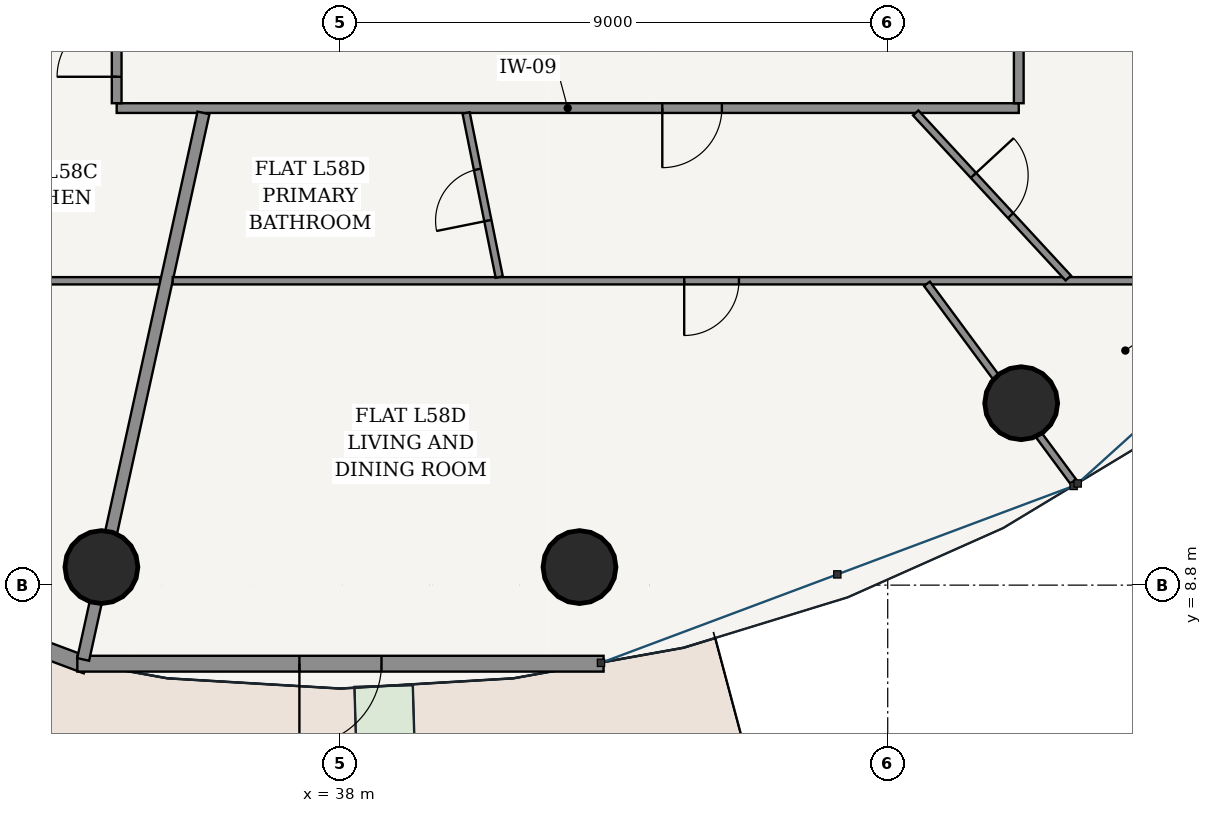
"""IFC4 building model, lengths in metres.
Left out: names, types, materials, properties, quantities, classifications, styles, units other than length and angle.
Written with IfcOpenShell. Run it as: python <this file> out.ifc"""

import sys

from ifc_helpers import new_model, si_unit, direction, frame, frame_2d, origin, origin_2d, place, context, subcontext, project, spatial, rectangle, hollow_circle, extrude, source, transform, mapped, element, fill, save


model = new_model("IFC4")
c1 = context("Model", 3, precision=1e-05, world=origin(), true_north=direction((-0.2419218956, 0.970295726276)))
c2 = subcontext(c1, "Body", "Model", "MODEL_VIEW")
j1 = project(units=[si_unit("LENGTHUNIT", "METRE"), si_unit("PLANEANGLEUNIT", "RADIAN")], contexts=[c1])
p1 = place(None, origin())
s1 = spatial("IfcSite", under=j1, at=p1, CompositionType="ELEMENT")
p2 = place(p1, origin())
s2 = spatial("IfcBuilding", under=s1, at=p2, CompositionType="ELEMENT")
p3 = place(p2, frame((0.0, 0.0, 220.8)))
s3 = spatial("IfcBuildingStorey", under=s2, at=p3, CompositionType="ELEMENT", Elevation=220.8)
for number, where, z_axis, x_axis in (
    (1, (34.069, 9.097, 0.0), (0.0, 0.0, 1.0), (1.0, 0.0, 0.0)),
    (2, (41.931, 9.097, 0.0), (0.0, 0.0, 1.0), (1.0, 0.0, 0.0)),
    (3, (49.195, 11.792, 0.0), (0.0, 0.0, 1.0), (1.0, 0.0, 0.0)),
):
    element("IfcColumn", number, at=place(p3, frame(where, z_axis=z_axis, x_axis=x_axis)), inside=s3, PredefinedType="COLUMN", context=c2, shape_type="SweptSolid", body=[
        extrude(hollow_circle(Radius=0.6, WallThickness=0.038, at=origin_2d()), origin(), (0.0, 0.0, 1.0), 3.7),
    ])
p4 = place(p3, frame((25.83, 10.473, 0.0), z_axis=(0.0, 0.0, 1.0), x_axis=(0.936556918375, -0.350515532672, 0.0)))
e4 = element("IfcWall", 4, at=p4, inside=s3, PredefinedType="SOLIDWALL", context=c2, shape_type="SweptSolid", body=[
    extrude(rectangle(XDim=8.539, YDim=0.28, at=frame_2d((4.27, 0.0))), origin(), (0.0, 0.0, 1.0), 3.435),
])
p5 = place(p4, frame((1.256, 0.0, 0.85)))
e5 = element("IfcOpeningElement", 5, at=p5, cuts=e4, PredefinedType="OPENING", context=c2, shape_type="SweptSolid", body=[
    extrude(rectangle(XDim=2.1, YDim=1.95, at=frame_2d((1.05, 0.975))), frame((0.0, 0.15, 0.0), z_axis=(0.0, -1.0, 0.0), x_axis=(1.0, 0.0, 0.0)), (0.0, 0.0, 1.0), 0.3),
])
p6 = place(p4, frame((5.184, 0.0, 0.85)))
e6 = element("IfcOpeningElement", 6, at=p6, cuts=e4, PredefinedType="OPENING", context=c2, shape_type="SweptSolid", body=[
    extrude(rectangle(XDim=2.1, YDim=1.95, at=frame_2d((1.05, 0.975))), frame((0.0, 0.15, 0.0), z_axis=(0.0, -1.0, 0.0), x_axis=(1.0, 0.0, 0.0)), (0.0, 0.0, 1.0), 0.3),
])
p7 = place(p3, frame((33.673, 7.508, 0.0), z_axis=(0.0, 0.0, 1.0), x_axis=(1.0, 0.0, 0.0)))
e7 = element("IfcWall", 7, at=p7, inside=s3, PredefinedType="SOLIDWALL", context=c2, shape_type="SweptSolid", body=[
    extrude(rectangle(XDim=8.654, YDim=0.26, at=frame_2d((4.327, 0.0))), origin(), (0.0, 0.0, 1.0), 3.435),
])
p8 = place(p7, frame((3.652, 0.0, 0.0)))
e8 = element("IfcOpeningElement", 8, at=p8, cuts=e7, PredefinedType="OPENING", context=c2, shape_type="SweptSolid", body=[
    extrude(rectangle(XDim=1.35, YDim=2.2, at=frame_2d((0.675, 1.1))), frame((0.0, 0.14, 0.0), z_axis=(0.0, -1.0, 0.0), x_axis=(1.0, 0.0, 0.0)), (0.0, 0.0, 1.0), 0.28),
])
p9 = place(p3, frame((34.32, 16.645, 0.0), z_axis=(0.0, 0.0, 1.0), x_axis=(1.0, 0.0, 0.0)))
e9 = element("IfcWall", 9, at=p9, inside=s3, PredefinedType="PARTITIONING", context=c2, shape_type="SweptSolid", body=[
    extrude(rectangle(XDim=14.835, YDim=0.16, at=frame_2d((7.417, 0.0))), origin(), (0.0, 0.0, 1.0), 2.951),
])
p10 = place(p9, frame((8.973, 0.0, 0.0)))
e10 = element("IfcOpeningElement", 10, at=p10, cuts=e9, PredefinedType="OPENING", context=c2, shape_type="SweptSolid", body=[
    extrude(rectangle(XDim=0.98, YDim=2.2, at=frame_2d((0.49, 1.1))), frame((0.0, 0.09, 0.0), z_axis=(0.0, -1.0, 0.0), x_axis=(1.0, 0.0, 0.0)), (0.0, 0.0, 1.0), 0.18),
])
p11 = place(p3, frame((34.32, 16.725, 0.0), z_axis=(0.0, 0.0, 1.0), x_axis=(0.0, 1.0, 0.0)))
e11 = element("IfcWall", 11, at=p11, inside=s3, PredefinedType="PARTITIONING", context=c2, shape_type="SweptSolid", body=[
    extrude(rectangle(XDim=1.85, YDim=0.16, at=frame_2d((0.925, 0.0))), origin(), (0.0, 0.0, 1.0), 3.435),
])
p12 = place(p11, frame((0.435, 0.0, 0.0)))
e12 = element("IfcOpeningElement", 12, at=p12, cuts=e11, PredefinedType="OPENING", context=c2, shape_type="SweptSolid", body=[
    extrude(rectangle(XDim=0.98, YDim=2.2, at=frame_2d((0.49, 1.1))), frame((0.0, 0.09, 0.0), z_axis=(0.0, -1.0, 0.0), x_axis=(1.0, 0.0, 0.0)), (0.0, 0.0, 1.0), 0.18),
])
p13 = place(p3, frame((49.155, 16.725, 0.0), z_axis=(0.0, 0.0, 1.0), x_axis=(0.0, 1.0, 0.0)))
e13 = element("IfcWall", 13, at=p13, inside=s3, PredefinedType="PARTITIONING", context=c2, shape_type="SweptSolid", body=[
    extrude(rectangle(XDim=18.3, YDim=0.16, at=frame_2d((9.15, 0.0))), origin(), (0.0, 0.0, 1.0), 2.951),
])
p14 = place(p13, frame((15.837, 0.0, 0.0)))
e14 = element("IfcOpeningElement", 14, at=p14, cuts=e13, PredefinedType="OPENING", context=c2, shape_type="SweptSolid", body=[
    extrude(rectangle(XDim=0.98, YDim=2.2, at=frame_2d((0.49, 1.1))), frame((0.0, 0.09, 0.0), z_axis=(0.0, -1.0, 0.0), x_axis=(1.0, 0.0, 0.0)), (0.0, 0.0, 1.0), 0.18),
])
p15 = place(p3, frame((35.038, 13.805, 0.0), z_axis=(0.0, 0.0, 1.0), x_axis=(-1.0, 0.0, 0.0)))
e15 = element("IfcWall", 15, at=p15, inside=s3, PredefinedType="PARTITIONING", context=c2, shape_type="SweptSolid", body=[
    extrude(rectangle(XDim=3.558, YDim=0.12, at=frame_2d((1.779, 0.0))), origin(), (0.0, 0.0, 1.0), 2.951),
])
p16 = place(p3, frame((35.747, 16.565, 0.0), z_axis=(0.0, 0.0, 1.0), x_axis=(-0.214957946814, -0.976623305631, 0.0)))
e16 = element("IfcWall", 16, at=p16, inside=s3, PredefinedType="PARTITIONING", context=c2, shape_type="SweptSolid", body=[
    extrude(rectangle(XDim=9.202, YDim=0.2, at=frame_2d((4.601, 0.0))), origin(), (0.0, 0.0, 1.0), 2.951),
])
p17 = place(p3, frame((51.995, 13.805, 0.0), z_axis=(0.0, 0.0, 1.0), x_axis=(-1.0, 0.0, 0.0)))
e17 = element("IfcWall", 17, at=p17, inside=s3, PredefinedType="PARTITIONING", context=c2, shape_type="SweptSolid", body=[
    extrude(rectangle(XDim=16.753, YDim=0.12, at=frame_2d((8.377, 0.0))), origin(), (0.0, 0.0, 1.0), 2.951),
])
p18 = place(p17, frame((7.442, 0.0, 0.0)))
e18 = element("IfcOpeningElement", 18, at=p18, cuts=e17, PredefinedType="OPENING", context=c2, shape_type="SweptSolid", body=[
    extrude(rectangle(XDim=0.9, YDim=2.15, at=frame_2d((0.45, 1.075))), frame((0.0, 0.07, 0.0), z_axis=(0.0, -1.0, 0.0), x_axis=(1.0, 0.0, 0.0)), (0.0, 0.0, 1.0), 0.14),
])
p19 = place(p3, frame((47.646, 13.755, 0.0), z_axis=(0.0, 0.0, 1.0), x_axis=(0.594518373783, -0.80408202519, 0.0)))
e19 = element("IfcWall", 19, at=p19, inside=s3, PredefinedType="PARTITIONING", context=c2, shape_type="SweptSolid", body=[
    extrude(rectangle(XDim=4.044, YDim=0.12, at=frame_2d((2.022, 0.0))), origin(), (0.0, 0.0, 1.0), 2.951),
])
p20 = place(p3, frame((40.066, 16.565, 0.0), z_axis=(0.0, 0.0, 1.0), x_axis=(0.197974199315, -0.980207231358, 0.0)))
e20 = element("IfcWall", 20, at=p20, inside=s3, PredefinedType="PARTITIONING", context=c2, shape_type="SweptSolid", body=[
    extrude(rectangle(XDim=2.754, YDim=0.12, at=frame_2d((1.377, 0.0))), origin(), (0.0, 0.0, 1.0), 3.11),
])
p21 = place(p20, frame((0.947, 0.0, 0.0)))
e21 = element("IfcOpeningElement", 21, at=p21, cuts=e20, PredefinedType="OPENING", context=c2, shape_type="SweptSolid", body=[
    extrude(rectangle(XDim=0.86, YDim=2.15, at=frame_2d((0.43, 1.075))), frame((0.0, 0.07, 0.0), z_axis=(0.0, -1.0, 0.0), x_axis=(1.0, 0.0, 0.0)), (0.0, 0.0, 1.0), 0.14),
])
p22 = place(p3, frame((47.46, 16.565, 0.0), z_axis=(0.0, 0.0, 1.0), x_axis=(0.678787443458, -0.734334805524, 0.0)))
e22 = element("IfcWall", 22, at=p22, inside=s3, PredefinedType="PARTITIONING", context=c2, shape_type="SweptSolid", body=[
    extrude(rectangle(XDim=3.696, YDim=0.12, at=frame_2d((1.848, 0.0))), origin(), (0.0, 0.0, 1.0), 2.951),
])
p23 = place(p22, frame((1.398, 0.0, 0.0)))
e23 = element("IfcOpeningElement", 23, at=p23, cuts=e22, PredefinedType="OPENING", context=c2, shape_type="SweptSolid", body=[
    extrude(rectangle(XDim=0.9, YDim=2.15, at=frame_2d((0.45, 1.075))), frame((0.0, 0.07, 0.0), z_axis=(0.0, -1.0, 0.0), x_axis=(1.0, 0.0, 0.0)), (0.0, 0.0, 1.0), 0.14),
])
m1 = source(origin(), c2, "Body", "SweptSolid", [
    extrude(rectangle(XDim=1.35, YDim=2.2, at=frame_2d((0.675, 1.1))), frame((0.0, 0.025, 0.0), z_axis=(0.0, -1.0, 0.0), x_axis=(1.0, 0.0, 0.0)), (0.0, 0.0, 1.0), 0.05),
])
p24 = place(p8, frame((1.35, 0.0, 0.0), z_axis=(0.0, 0.0, 1.0), x_axis=(-1.0, 0.0, 0.0)))
e24 = element("IfcDoor", 24, at=p24, inside=s3, OperationType="SINGLE_SWING_RIGHT", PredefinedType="DOOR", context=c2, shape_type="MappedRepresentation", body=[
    mapped(m1, transform((0.0, 0.0, 0.0), scale=1.0)),
])
fill(e8, e24)
m2 = source(origin(), c2, "Body", "SweptSolid", [
    extrude(rectangle(XDim=0.98, YDim=2.2, at=frame_2d((0.49, 1.1))), frame((0.0, 0.025, 0.0), z_axis=(0.0, -1.0, 0.0), x_axis=(1.0, 0.0, 0.0)), (0.0, 0.0, 1.0), 0.05),
])
p25 = place(p12, origin())
e25 = element("IfcDoor", 25, at=p25, inside=s3, OperationType="SINGLE_SWING_LEFT", PredefinedType="DOOR", context=c2, shape_type="MappedRepresentation", body=[
    mapped(m2, transform((0.0, 0.0, 0.0), scale=1.0)),
])
fill(e12, e25)
p26 = place(p10, frame((0.98, 0.0, 0.0), z_axis=(0.0, 0.0, 1.0), x_axis=(-1.0, 0.0, 0.0)))
e26 = element("IfcDoor", 26, at=p26, inside=s3, OperationType="SINGLE_SWING_RIGHT", PredefinedType="DOOR", context=c2, shape_type="MappedRepresentation", body=[
    mapped(m2, transform((0.0, 0.0, 0.0), scale=1.0)),
])
fill(e10, e26)
m3 = source(origin(), c2, "Body", "SweptSolid", [
    extrude(rectangle(XDim=0.86, YDim=2.15, at=frame_2d((0.43, 1.075))), frame((0.0, 0.025, 0.0), z_axis=(0.0, -1.0, 0.0), x_axis=(1.0, 0.0, 0.0)), (0.0, 0.0, 1.0), 0.05),
])
p27 = place(p21, frame((0.86, 0.0, 0.0), z_axis=(0.0, 0.0, 1.0), x_axis=(-1.0, 0.0, 0.0)))
e27 = element("IfcDoor", 27, at=p27, inside=s3, OperationType="SINGLE_SWING_LEFT", PredefinedType="DOOR", context=c2, shape_type="MappedRepresentation", body=[
    mapped(m3, transform((0.0, 0.0, 0.0), scale=1.0)),
])
fill(e21, e27)
m4 = source(origin(), c2, "Body", "SweptSolid", [
    extrude(rectangle(XDim=0.9, YDim=2.15, at=frame_2d((0.45, 1.075))), frame((0.0, 0.025, 0.0), z_axis=(0.0, -1.0, 0.0), x_axis=(1.0, 0.0, 0.0)), (0.0, 0.0, 1.0), 0.05),
])
p28 = place(p18, origin())
e28 = element("IfcDoor", 28, at=p28, inside=s3, OperationType="SINGLE_SWING_RIGHT", PredefinedType="DOOR", context=c2, shape_type="MappedRepresentation", body=[
    mapped(m4, transform((0.0, 0.0, 0.0), scale=1.0)),
])
fill(e18, e28)
p29 = place(p23, origin())
e29 = element("IfcDoor", 29, at=p29, inside=s3, OperationType="SINGLE_SWING_LEFT", PredefinedType="DOOR", context=c2, shape_type="MappedRepresentation", body=[
    mapped(m4, transform((0.0, 0.0, 0.0), scale=1.0)),
])
fill(e23, e29)
save(model, sys.argv[1])
